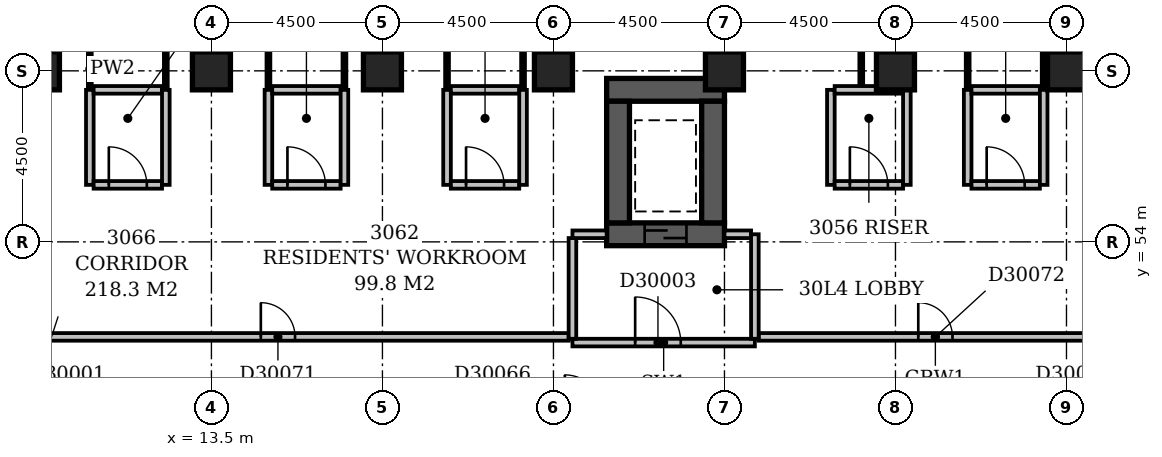
"""IFC4 building model, lengths in metres.
Left out: names, types, materials, properties, quantities, classifications, styles, units other than length and angle.
Written with IfcOpenShell. Run it as: python <this file> out.ifc"""

import sys

from ifc_helpers import new_model, si_unit, direction, frame, frame_2d, origin, origin_2d, place, context, subcontext, project, spatial, rectangle, extrude, element, fill, save


model = new_model("IFC4")
c1 = context("Model", 3, precision=1e-05, world=origin(), true_north=direction((0.0, 1.0)))
c2 = subcontext(c1, "Body", "Model", "MODEL_VIEW")
j1 = project(units=[si_unit("LENGTHUNIT", "METRE"), si_unit("PLANEANGLEUNIT", "RADIAN")], contexts=[c1])
p1 = place(None, origin())
s1 = spatial("IfcSite", under=j1, at=p1, CompositionType="ELEMENT")
p2 = place(p1, origin())
s2 = spatial("IfcBuilding", under=s1, at=p2, CompositionType="ELEMENT")
p3 = place(p2, frame((0.0, 0.0, 123.2)))
s3 = spatial("IfcBuildingStorey", under=s2, at=p3, CompositionType="ELEMENT", Elevation=123.2)
p4 = place(p3, frame((23.9, 54.2, -0.3), z_axis=(0.0, 0.0, 1.0), x_axis=(1.0, 0.0, 0.0)))
e1 = element("IfcWall", 1, at=p4, inside=s3, PredefinedType="SHEAR", context=c2, shape_type="SweptSolid", body=[
    extrude(rectangle(XDim=3.1, YDim=0.6, at=frame_2d((1.55, 0.0))), origin(), (0.0, 0.0, 1.0), 3.6),
])
p5 = place(p4, frame((1.0, 0.0, 0.3)))
e2 = element("IfcOpeningElement", 2, at=p5, cuts=e1, PredefinedType="OPENING", context=c2, shape_type="SweptSolid", body=[
    extrude(rectangle(XDim=1.1, YDim=2.1, at=frame_2d((0.55, 1.05))), frame((0.0, 0.312, 0.0), z_axis=(0.0, -1.0, 0.0), x_axis=(1.0, 0.0, 0.0)), (0.0, 0.0, 1.0), 0.624),
])
p6 = place(p3, frame((23.9, 58.0, -0.3), z_axis=(0.0, 0.0, 1.0), x_axis=(1.0, 0.0, 0.0)))
e3 = element("IfcWall", 3, at=p6, inside=s3, PredefinedType="SHEAR", context=c2, shape_type="SweptSolid", body=[
    extrude(rectangle(XDim=3.1, YDim=0.6, at=frame_2d((1.55, 0.0))), origin(), (0.0, 0.0, 1.0), 3.6),
])
for number, where, z_axis, x_axis in (
    (4, (24.2, 54.5, -0.3), (0.0, 0.0, 1.0), (0.0, 1.0, 0.0)),
    (5, (26.7, 54.5, -0.3), (0.0, 0.0, 1.0), (0.0, 1.0, 0.0)),
):
    element("IfcWall", number, at=place(p3, frame(where, z_axis=z_axis, x_axis=x_axis)), inside=s3, PredefinedType="SHEAR", context=c2, shape_type="SweptSolid", body=[
        extrude(rectangle(XDim=3.2, YDim=0.6, at=frame_2d((1.6, 0.0))), origin(), (0.0, 0.0, 1.0), 3.6),
    ])
for number, where, z_axis, x_axis in (
    (6, (9.0, 58.5, -0.3), (0.0, 0.0, 1.0), (1.0, 0.0, 0.0)),
    (7, (13.5, 58.5, -0.3), (0.0, 0.0, 1.0), (1.0, 0.0, 0.0)),
    (8, (18.0, 58.5, -0.3), (0.0, 0.0, 1.0), (1.0, 0.0, 0.0)),
    (9, (22.5, 58.5, -0.3), (0.0, 0.0, 1.0), (1.0, 0.0, 0.0)),
    (10, (27.0, 58.5, -0.3), (0.0, 0.0, 1.0), (1.0, 0.0, 0.0)),
    (11, (31.5, 58.5, -0.3), (0.0, 0.0, 1.0), (1.0, 0.0, 0.0)),
    (12, (36.0, 58.5, -0.3), (0.0, 0.0, 1.0), (1.0, 0.0, 0.0)),
):
    element("IfcColumn", number, at=place(p3, frame(where, z_axis=z_axis, x_axis=x_axis)), inside=s3, PredefinedType="COLUMN", context=c2, shape_type="SweptSolid", body=[
        extrude(rectangle(XDim=1.0, YDim=1.0, at=origin_2d()), origin(), (0.0, 0.0, 1.0), 3.6),
    ])
p7 = place(p3, frame((23.0, 51.35, 0.0), z_axis=(0.0, 0.0, 1.0), x_axis=(1.0, 0.0, 0.0)))
e13 = element("IfcWall", 13, at=p7, inside=s3, PredefinedType="PARTITIONING", context=c2, shape_type="SweptSolid", body=[
    extrude(rectangle(XDim=4.8, YDim=0.2, at=frame_2d((2.4, 0.0))), origin(), (0.0, 0.0, 1.0), 3.3),
])
p8 = place(p7, frame((1.65, 0.0, 0.0)))
e14 = element("IfcOpeningElement", 14, at=p8, cuts=e13, PredefinedType="OPENING", context=c2, shape_type="SweptSolid", body=[
    extrude(rectangle(XDim=1.2, YDim=2.1, at=frame_2d((0.6, 1.05))), frame((0.0, 0.112, 0.0), z_axis=(0.0, -1.0, 0.0), x_axis=(1.0, 0.0, 0.0)), (0.0, 0.0, 1.0), 0.224),
])
p9 = place(p3, frame((27.8, 51.45, 0.0), z_axis=(0.0, 0.0, 1.0), x_axis=(0.0, 1.0, 0.0)))
e15 = element("IfcWall", 15, at=p9, inside=s3, PredefinedType="PARTITIONING", context=c2, shape_type="SweptSolid", body=[
    extrude(rectangle(XDim=2.75, YDim=0.2, at=frame_2d((1.375, 0.0))), origin(), (0.0, 0.0, 1.0), 3.3),
])
p10 = place(p3, frame((23.0, 54.2, 0.0), z_axis=(0.0, 0.0, 1.0), x_axis=(1.0, 0.0, 0.0)))
e16 = element("IfcWall", 16, at=p10, inside=s3, PredefinedType="PARTITIONING", context=c2, shape_type="SweptSolid", body=[
    extrude(rectangle(XDim=0.9, YDim=0.2, at=frame_2d((0.45, 0.0))), origin(), (0.0, 0.0, 1.0), 3.3),
])
p11 = place(p3, frame((27.0, 54.2, 0.0), z_axis=(0.0, 0.0, 1.0), x_axis=(1.0, 0.0, 0.0)))
e17 = element("IfcWall", 17, at=p11, inside=s3, PredefinedType="PARTITIONING", context=c2, shape_type="SweptSolid", body=[
    extrude(rectangle(XDim=0.7, YDim=0.2, at=frame_2d((0.35, 0.0))), origin(), (0.0, 0.0, 1.0), 3.3),
])
p12 = place(p3, frame((23.0, 51.45, 0.0), z_axis=(0.0, 0.0, 1.0), x_axis=(0.0, 1.0, 0.0)))
e18 = element("IfcWall", 18, at=p12, inside=s3, PredefinedType="PARTITIONING", context=c2, shape_type="SweptSolid", body=[
    extrude(rectangle(XDim=2.65, YDim=0.2, at=frame_2d((1.325, 0.0))), origin(), (0.0, 0.0, 1.0), 3.3),
])
p13 = place(p3, frame((7.6, 51.5, 0.0), z_axis=(0.0, 0.0, 1.0), x_axis=(1.0, 0.0, 0.0)))
e19 = element("IfcWall", 19, at=p13, inside=s3, PredefinedType="PARTITIONING", context=c2, shape_type="SweptSolid", body=[
    extrude(rectangle(XDim=15.3, YDim=0.2, at=frame_2d((7.65, 0.0))), origin(), (0.0, 0.0, 1.0), 3.3),
])
p14 = place(p13, frame((7.2, 0.0, 0.0)))
e20 = element("IfcOpeningElement", 20, at=p14, cuts=e19, PredefinedType="OPENING", context=c2, shape_type="SweptSolid", body=[
    extrude(rectangle(XDim=0.9, YDim=2.1, at=frame_2d((0.45, 1.05))), frame((0.0, 0.112, 0.0), z_axis=(0.0, -1.0, 0.0), x_axis=(1.0, 0.0, 0.0)), (0.0, 0.0, 1.0), 0.224),
])
p15 = place(p3, frame((27.9, 51.5, 0.0), z_axis=(0.0, 0.0, 1.0), x_axis=(1.0, 0.0, 0.0)))
e21 = element("IfcWall", 21, at=p15, inside=s3, PredefinedType="PARTITIONING", context=c2, shape_type="SweptSolid", body=[
    extrude(rectangle(XDim=9.3, YDim=0.2, at=frame_2d((4.65, 0.0))), origin(), (0.0, 0.0, 1.0), 3.3),
])
p16 = place(p15, frame((4.2, 0.0, 0.0)))
e22 = element("IfcOpeningElement", 22, at=p16, cuts=e21, PredefinedType="OPENING", context=c2, shape_type="SweptSolid", body=[
    extrude(rectangle(XDim=0.9, YDim=2.1, at=frame_2d((0.45, 1.05))), frame((0.0, 0.112, 0.0), z_axis=(0.0, -1.0, 0.0), x_axis=(1.0, 0.0, 0.0)), (0.0, 0.0, 1.0), 0.224),
])
p17 = place(p3, frame((10.3, 55.5, 0.0), z_axis=(0.0, 0.0, 1.0), x_axis=(0.0, 1.0, 0.0)))
e23 = element("IfcWall", 23, at=p17, inside=s3, PredefinedType="PARTITIONING", context=c2, shape_type="SweptSolid", body=[
    extrude(rectangle(XDim=2.5, YDim=0.2, at=frame_2d((1.25, 0.0))), origin(), (0.0, 0.0, 1.0), 3.3),
])
p18 = place(p3, frame((10.4, 55.5, 0.0), z_axis=(0.0, 0.0, 1.0), x_axis=(1.0, 0.0, 0.0)))
e24 = element("IfcWall", 24, at=p18, inside=s3, PredefinedType="PARTITIONING", context=c2, shape_type="SweptSolid", body=[
    extrude(rectangle(XDim=1.8, YDim=0.2, at=frame_2d((0.9, 0.0))), origin(), (0.0, 0.0, 1.0), 3.3),
])
p19 = place(p18, frame((0.4, 0.0, 0.0)))
e25 = element("IfcOpeningElement", 25, at=p19, cuts=e24, PredefinedType="OPENING", context=c2, shape_type="SweptSolid", body=[
    extrude(rectangle(XDim=1.0, YDim=2.1, at=frame_2d((0.5, 1.05))), frame((0.0, 0.112, 0.0), z_axis=(0.0, -1.0, 0.0), x_axis=(1.0, 0.0, 0.0)), (0.0, 0.0, 1.0), 0.224),
])
for number, where, z_axis, x_axis in (
    (26, (12.3, 55.5, 0.0), (0.0, 0.0, 1.0), (0.0, 1.0, 0.0)),
    (27, (15.0, 55.5, 0.0), (0.0, 0.0, 1.0), (0.0, 1.0, 0.0)),
):
    element("IfcWall", number, at=place(p3, frame(where, z_axis=z_axis, x_axis=x_axis)), inside=s3, PredefinedType="PARTITIONING", context=c2, shape_type="SweptSolid", body=[
        extrude(rectangle(XDim=2.5, YDim=0.2, at=frame_2d((1.25, 0.0))), origin(), (0.0, 0.0, 1.0), 3.3),
    ])
p20 = place(p3, frame((15.1, 55.5, 0.0), z_axis=(0.0, 0.0, 1.0), x_axis=(1.0, 0.0, 0.0)))
e28 = element("IfcWall", 28, at=p20, inside=s3, PredefinedType="PARTITIONING", context=c2, shape_type="SweptSolid", body=[
    extrude(rectangle(XDim=1.8, YDim=0.2, at=frame_2d((0.9, 0.0))), origin(), (0.0, 0.0, 1.0), 3.3),
])
p21 = place(p20, frame((0.4, 0.0, 0.0)))
e29 = element("IfcOpeningElement", 29, at=p21, cuts=e28, PredefinedType="OPENING", context=c2, shape_type="SweptSolid", body=[
    extrude(rectangle(XDim=1.0, YDim=2.1, at=frame_2d((0.5, 1.05))), frame((0.0, 0.112, 0.0), z_axis=(0.0, -1.0, 0.0), x_axis=(1.0, 0.0, 0.0)), (0.0, 0.0, 1.0), 0.224),
])
for number, where, z_axis, x_axis in (
    (30, (17.0, 55.5, 0.0), (0.0, 0.0, 1.0), (0.0, 1.0, 0.0)),
    (31, (19.7, 55.5, 0.0), (0.0, 0.0, 1.0), (0.0, 1.0, 0.0)),
):
    element("IfcWall", number, at=place(p3, frame(where, z_axis=z_axis, x_axis=x_axis)), inside=s3, PredefinedType="PARTITIONING", context=c2, shape_type="SweptSolid", body=[
        extrude(rectangle(XDim=2.5, YDim=0.2, at=frame_2d((1.25, 0.0))), origin(), (0.0, 0.0, 1.0), 3.3),
    ])
p22 = place(p3, frame((19.8, 55.5, 0.0), z_axis=(0.0, 0.0, 1.0), x_axis=(1.0, 0.0, 0.0)))
e32 = element("IfcWall", 32, at=p22, inside=s3, PredefinedType="PARTITIONING", context=c2, shape_type="SweptSolid", body=[
    extrude(rectangle(XDim=1.8, YDim=0.2, at=frame_2d((0.9, 0.0))), origin(), (0.0, 0.0, 1.0), 3.3),
])
p23 = place(p22, frame((0.4, 0.0, 0.0)))
e33 = element("IfcOpeningElement", 33, at=p23, cuts=e32, PredefinedType="OPENING", context=c2, shape_type="SweptSolid", body=[
    extrude(rectangle(XDim=1.0, YDim=2.1, at=frame_2d((0.5, 1.05))), frame((0.0, 0.112, 0.0), z_axis=(0.0, -1.0, 0.0), x_axis=(1.0, 0.0, 0.0)), (0.0, 0.0, 1.0), 0.224),
])
for number, where, z_axis, x_axis in (
    (34, (21.7, 55.5, 0.0), (0.0, 0.0, 1.0), (0.0, 1.0, 0.0)),
    (35, (29.8, 55.5, 0.0), (0.0, 0.0, 1.0), (0.0, 1.0, 0.0)),
):
    element("IfcWall", number, at=place(p3, frame(where, z_axis=z_axis, x_axis=x_axis)), inside=s3, PredefinedType="PARTITIONING", context=c2, shape_type="SweptSolid", body=[
        extrude(rectangle(XDim=2.5, YDim=0.2, at=frame_2d((1.25, 0.0))), origin(), (0.0, 0.0, 1.0), 3.3),
    ])
p24 = place(p3, frame((29.9, 55.5, 0.0), z_axis=(0.0, 0.0, 1.0), x_axis=(1.0, 0.0, 0.0)))
e36 = element("IfcWall", 36, at=p24, inside=s3, PredefinedType="PARTITIONING", context=c2, shape_type="SweptSolid", body=[
    extrude(rectangle(XDim=1.8, YDim=0.2, at=frame_2d((0.9, 0.0))), origin(), (0.0, 0.0, 1.0), 3.3),
])
p25 = place(p24, frame((0.4, 0.0, 0.0)))
e37 = element("IfcOpeningElement", 37, at=p25, cuts=e36, PredefinedType="OPENING", context=c2, shape_type="SweptSolid", body=[
    extrude(rectangle(XDim=1.0, YDim=2.1, at=frame_2d((0.5, 1.05))), frame((0.0, 0.112, 0.0), z_axis=(0.0, -1.0, 0.0), x_axis=(1.0, 0.0, 0.0)), (0.0, 0.0, 1.0), 0.224),
])
for number, where, z_axis, x_axis in (
    (38, (31.8, 55.5, 0.0), (0.0, 0.0, 1.0), (0.0, 1.0, 0.0)),
    (39, (33.4, 55.5, 0.0), (0.0, 0.0, 1.0), (0.0, 1.0, 0.0)),
):
    element("IfcWall", number, at=place(p3, frame(where, z_axis=z_axis, x_axis=x_axis)), inside=s3, PredefinedType="PARTITIONING", context=c2, shape_type="SweptSolid", body=[
        extrude(rectangle(XDim=2.5, YDim=0.2, at=frame_2d((1.25, 0.0))), origin(), (0.0, 0.0, 1.0), 3.3),
    ])
p26 = place(p3, frame((33.5, 55.5, 0.0), z_axis=(0.0, 0.0, 1.0), x_axis=(1.0, 0.0, 0.0)))
e40 = element("IfcWall", 40, at=p26, inside=s3, PredefinedType="PARTITIONING", context=c2, shape_type="SweptSolid", body=[
    extrude(rectangle(XDim=1.8, YDim=0.2, at=frame_2d((0.9, 0.0))), origin(), (0.0, 0.0, 1.0), 3.3),
])
p27 = place(p26, frame((0.4, 0.0, 0.0)))
e41 = element("IfcOpeningElement", 41, at=p27, cuts=e40, PredefinedType="OPENING", context=c2, shape_type="SweptSolid", body=[
    extrude(rectangle(XDim=1.0, YDim=2.1, at=frame_2d((0.5, 1.05))), frame((0.0, 0.112, 0.0), z_axis=(0.0, -1.0, 0.0), x_axis=(1.0, 0.0, 0.0)), (0.0, 0.0, 1.0), 0.224),
])
p28 = place(p3, frame((35.4, 55.5, 0.0), z_axis=(0.0, 0.0, 1.0), x_axis=(0.0, 1.0, 0.0)))
e42 = element("IfcWall", 42, at=p28, inside=s3, PredefinedType="PARTITIONING", context=c2, shape_type="SweptSolid", body=[
    extrude(rectangle(XDim=2.5, YDim=0.2, at=frame_2d((1.25, 0.0))), origin(), (0.0, 0.0, 1.0), 2.4),
])
p29 = place(p3, frame((10.3, 58.0, 0.0), z_axis=(0.0, 0.0, 1.0), x_axis=(0.0, 1.0, 0.0)))
e43 = element("IfcWall", 43, at=p29, inside=s3, PredefinedType="PARTITIONING", context=c2, shape_type="SweptSolid", body=[
    extrude(rectangle(XDim=1.1, YDim=0.1, at=frame_2d((0.55, 0.0))), origin(), (0.0, 0.0, 1.0), 3.3),
])
p30 = place(p3, frame((10.4, 58.0, 0.0), z_axis=(0.0, 0.0, 1.0), x_axis=(1.0, 0.0, 0.0)))
e44 = element("IfcWall", 44, at=p30, inside=s3, PredefinedType="PARTITIONING", context=c2, shape_type="SweptSolid", body=[
    extrude(rectangle(XDim=1.8, YDim=0.2, at=frame_2d((0.9, 0.0))), origin(), (0.0, 0.0, 1.0), 3.3),
])
for number, where, z_axis, x_axis in (
    (45, (12.3, 58.0, 0.0), (0.0, 0.0, 1.0), (0.0, 1.0, 0.0)),
    (46, (15.0, 58.0, 0.0), (0.0, 0.0, 1.0), (0.0, 1.0, 0.0)),
):
    element("IfcWall", number, at=place(p3, frame(where, z_axis=z_axis, x_axis=x_axis)), inside=s3, PredefinedType="PARTITIONING", context=c2, shape_type="SweptSolid", body=[
        extrude(rectangle(XDim=1.1, YDim=0.1, at=frame_2d((0.55, 0.0))), origin(), (0.0, 0.0, 1.0), 3.3),
    ])
p31 = place(p3, frame((15.1, 58.0, 0.0), z_axis=(0.0, 0.0, 1.0), x_axis=(1.0, 0.0, 0.0)))
e47 = element("IfcWall", 47, at=p31, inside=s3, PredefinedType="PARTITIONING", context=c2, shape_type="SweptSolid", body=[
    extrude(rectangle(XDim=1.8, YDim=0.2, at=frame_2d((0.9, 0.0))), origin(), (0.0, 0.0, 1.0), 3.3),
])
for number, where, z_axis, x_axis in (
    (48, (17.0, 58.0, 0.0), (0.0, 0.0, 1.0), (0.0, 1.0, 0.0)),
    (49, (19.7, 58.0, 0.0), (0.0, 0.0, 1.0), (0.0, 1.0, 0.0)),
):
    element("IfcWall", number, at=place(p3, frame(where, z_axis=z_axis, x_axis=x_axis)), inside=s3, PredefinedType="PARTITIONING", context=c2, shape_type="SweptSolid", body=[
        extrude(rectangle(XDim=1.1, YDim=0.1, at=frame_2d((0.55, 0.0))), origin(), (0.0, 0.0, 1.0), 3.3),
    ])
p32 = place(p3, frame((19.8, 58.0, 0.0), z_axis=(0.0, 0.0, 1.0), x_axis=(1.0, 0.0, 0.0)))
e50 = element("IfcWall", 50, at=p32, inside=s3, PredefinedType="PARTITIONING", context=c2, shape_type="SweptSolid", body=[
    extrude(rectangle(XDim=1.8, YDim=0.2, at=frame_2d((0.9, 0.0))), origin(), (0.0, 0.0, 1.0), 3.3),
])
p33 = place(p3, frame((21.7, 58.0, 0.0), z_axis=(0.0, 0.0, 1.0), x_axis=(0.0, 1.0, 0.0)))
e51 = element("IfcWall", 51, at=p33, inside=s3, PredefinedType="PARTITIONING", context=c2, shape_type="SweptSolid", body=[
    extrude(rectangle(XDim=1.1, YDim=0.1, at=frame_2d((0.55, 0.0))), origin(), (0.0, 0.0, 1.0), 3.3),
])
p34 = place(p3, frame((29.9, 58.0, 0.0), z_axis=(0.0, 0.0, 1.0), x_axis=(1.0, 0.0, 0.0)))
e52 = element("IfcWall", 52, at=p34, inside=s3, PredefinedType="PARTITIONING", context=c2, shape_type="SweptSolid", body=[
    extrude(rectangle(XDim=1.8, YDim=0.2, at=frame_2d((0.9, 0.0))), origin(), (0.0, 0.0, 1.0), 3.3),
])
p35 = place(p3, frame((33.4, 58.0, 0.0), z_axis=(0.0, 0.0, 1.0), x_axis=(0.0, 1.0, 0.0)))
e53 = element("IfcWall", 53, at=p35, inside=s3, PredefinedType="PARTITIONING", context=c2, shape_type="SweptSolid", body=[
    extrude(rectangle(XDim=1.1, YDim=0.1, at=frame_2d((0.55, 0.0))), origin(), (0.0, 0.0, 1.0), 3.3),
])
p36 = place(p3, frame((33.5, 58.0, 0.0), z_axis=(0.0, 0.0, 1.0), x_axis=(1.0, 0.0, 0.0)))
e54 = element("IfcWall", 54, at=p36, inside=s3, PredefinedType="PARTITIONING", context=c2, shape_type="SweptSolid", body=[
    extrude(rectangle(XDim=1.8, YDim=0.2, at=frame_2d((0.9, 0.0))), origin(), (0.0, 0.0, 1.0), 3.3),
])
p37 = place(p3, frame((35.4, 58.0, 0.0), z_axis=(0.0, 0.0, 1.0), x_axis=(0.0, 1.0, 0.0)))
e55 = element("IfcWall", 55, at=p37, inside=s3, PredefinedType="PARTITIONING", context=c2, shape_type="SweptSolid", body=[
    extrude(rectangle(XDim=1.1, YDim=0.1, at=frame_2d((0.55, 0.0))), origin(), (0.0, 0.0, 1.0), 2.4),
])
p38 = place(p3, frame((30.6, 58.1, 0.0), z_axis=(0.0, 0.0, 1.0), x_axis=(0.0, 1.0, 0.0)))
e56 = element("IfcWall", 56, at=p38, inside=s3, PredefinedType="PARTITIONING", context=c2, shape_type="SweptSolid", body=[
    extrude(rectangle(XDim=1.0, YDim=0.1, at=frame_2d((0.5, 0.0))), origin(), (0.0, 0.0, 1.0), 3.3),
])
p39 = place(p8, origin())
e57 = element("IfcDoor", 57, at=p39, inside=s3, OperationType="SINGLE_SWING_LEFT", PredefinedType="DOOR", context=c2, shape_type="SweptSolid", body=[
    extrude(rectangle(XDim=1.2, YDim=2.1, at=frame_2d((0.6, 1.05))), frame((0.0, 0.025, 0.0), z_axis=(0.0, -1.0, 0.0), x_axis=(1.0, 0.0, 0.0)), (0.0, 0.0, 1.0), 0.05),
])
fill(e14, e57)
p40 = place(p5, origin())
e58 = element("IfcDoor", 58, at=p40, inside=s3, OperationType="SLIDING_TO_LEFT", PredefinedType="DOOR", context=c2, shape_type="SweptSolid", body=[
    extrude(rectangle(XDim=1.1, YDim=2.1, at=frame_2d((0.55, 1.05))), frame((0.0, 0.025, 0.0), z_axis=(0.0, -1.0, 0.0), x_axis=(1.0, 0.0, 0.0)), (0.0, 0.0, 1.0), 0.05),
])
fill(e2, e58)
p41 = place(p14, origin())
e59 = element("IfcDoor", 59, at=p41, inside=s3, OperationType="SINGLE_SWING_LEFT", PredefinedType="DOOR", context=c2, shape_type="SweptSolid", body=[
    extrude(rectangle(XDim=0.9, YDim=2.1, at=frame_2d((0.45, 1.05))), frame((0.0, 0.025, 0.0), z_axis=(0.0, -1.0, 0.0), x_axis=(1.0, 0.0, 0.0)), (0.0, 0.0, 1.0), 0.05),
])
fill(e20, e59)
p42 = place(p16, origin())
e60 = element("IfcDoor", 60, at=p42, inside=s3, OperationType="SINGLE_SWING_LEFT", PredefinedType="DOOR", context=c2, shape_type="SweptSolid", body=[
    extrude(rectangle(XDim=0.9, YDim=2.1, at=frame_2d((0.45, 1.05))), frame((0.0, 0.025, 0.0), z_axis=(0.0, -1.0, 0.0), x_axis=(1.0, 0.0, 0.0)), (0.0, 0.0, 1.0), 0.05),
])
fill(e22, e60)
p43 = place(p19, origin())
e61 = element("IfcDoor", 61, at=p43, inside=s3, OperationType="SINGLE_SWING_LEFT", PredefinedType="DOOR", context=c2, shape_type="SweptSolid", body=[
    extrude(rectangle(XDim=1.0, YDim=2.1, at=frame_2d((0.5, 1.05))), frame((0.0, 0.025, 0.0), z_axis=(0.0, -1.0, 0.0), x_axis=(1.0, 0.0, 0.0)), (0.0, 0.0, 1.0), 0.05),
])
fill(e25, e61)
p44 = place(p21, origin())
e62 = element("IfcDoor", 62, at=p44, inside=s3, OperationType="SINGLE_SWING_LEFT", PredefinedType="DOOR", context=c2, shape_type="SweptSolid", body=[
    extrude(rectangle(XDim=1.0, YDim=2.1, at=frame_2d((0.5, 1.05))), frame((0.0, 0.025, 0.0), z_axis=(0.0, -1.0, 0.0), x_axis=(1.0, 0.0, 0.0)), (0.0, 0.0, 1.0), 0.05),
])
fill(e29, e62)
p45 = place(p23, origin())
e63 = element("IfcDoor", 63, at=p45, inside=s3, OperationType="SINGLE_SWING_LEFT", PredefinedType="DOOR", context=c2, shape_type="SweptSolid", body=[
    extrude(rectangle(XDim=1.0, YDim=2.1, at=frame_2d((0.5, 1.05))), frame((0.0, 0.025, 0.0), z_axis=(0.0, -1.0, 0.0), x_axis=(1.0, 0.0, 0.0)), (0.0, 0.0, 1.0), 0.05),
])
fill(e33, e63)
p46 = place(p25, origin())
e64 = element("IfcDoor", 64, at=p46, inside=s3, OperationType="SINGLE_SWING_LEFT", PredefinedType="DOOR", context=c2, shape_type="SweptSolid", body=[
    extrude(rectangle(XDim=1.0, YDim=2.1, at=frame_2d((0.5, 1.05))), frame((0.0, 0.025, 0.0), z_axis=(0.0, -1.0, 0.0), x_axis=(1.0, 0.0, 0.0)), (0.0, 0.0, 1.0), 0.05),
])
fill(e37, e64)
p47 = place(p27, origin())
e65 = element("IfcDoor", 65, at=p47, inside=s3, OperationType="SINGLE_SWING_LEFT", PredefinedType="DOOR", context=c2, shape_type="SweptSolid", body=[
    extrude(rectangle(XDim=1.0, YDim=2.1, at=frame_2d((0.5, 1.05))), frame((0.0, 0.025, 0.0), z_axis=(0.0, -1.0, 0.0), x_axis=(1.0, 0.0, 0.0)), (0.0, 0.0, 1.0), 0.05),
])
fill(e41, e65)
save(model, sys.argv[1])
